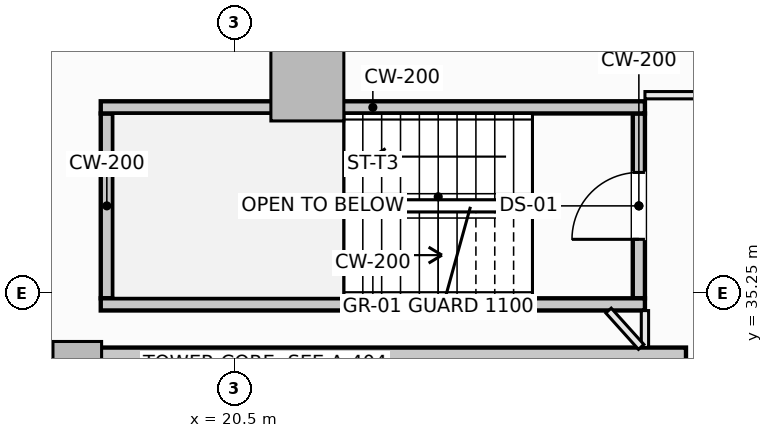
"""IFC4 building model, lengths in metres.
Left out: names, types, materials, properties, quantities, classifications, styles, units other than length and angle.
Written with IfcOpenShell. Run it as: python <this file> out.ifc"""

import sys

from ifc_helpers import new_model, si_unit, direction, frame, frame_2d, origin, origin_2d, place, context, subcontext, project, spatial, rectangle, extrude, element, fill, save


model = new_model("IFC4")
c1 = context("Model", 3, precision=1e-05, world=origin(), true_north=direction((0.0, 1.0)))
c2 = subcontext(c1, "Body", "Model", "MODEL_VIEW")
j1 = project(units=[si_unit("LENGTHUNIT", "METRE"), si_unit("PLANEANGLEUNIT", "RADIAN")], contexts=[c1])
p1 = place(None, origin())
s1 = spatial("IfcSite", under=j1, at=p1, CompositionType="ELEMENT")
p2 = place(p1, origin())
s2 = spatial("IfcBuilding", under=s1, at=p2, CompositionType="ELEMENT")
p3 = place(p2, frame((0.0, 0.0, 88.1)))
s3 = spatial("IfcBuildingStorey", under=s2, at=p3, CompositionType="ELEMENT", Elevation=88.1)
p4 = place(p3, frame((14.075, 33.925, -0.28), z_axis=(0.0, 0.0, 1.0), x_axis=(1.0, 0.0, 0.0)))
e1 = element("IfcWall", 1, at=p4, inside=s3, PredefinedType="SHEAR", context=c2, shape_type="SweptSolid", body=[
    extrude(rectangle(XDim=13.85, YDim=0.85, at=frame_2d((6.925, 0.0))), origin(), (0.0, 0.0, 1.0), 3.85),
])
p5 = place(p3, frame((21.698, 38.677, -0.28), z_axis=(0.0, 0.0, 1.0), x_axis=(1.0, 0.0, 0.0)))
e2 = element("IfcColumn", 2, at=p5, inside=s3, PredefinedType="COLUMN", context=c2, shape_type="SweptSolid", body=[
    extrude(rectangle(XDim=1.2, YDim=1.2, at=origin_2d()), origin(), (0.0, 0.0, 1.0), 3.85),
])
p6 = place(p3, frame((17.914, 34.05, -0.28), z_axis=(0.0, 0.0, 1.0), x_axis=(1.0, 0.0, 0.0)))
e3 = element("IfcColumn", 3, at=p6, inside=s3, PredefinedType="PILASTER", context=c2, shape_type="SweptSolid", body=[
    extrude(rectangle(XDim=0.8, YDim=0.8, at=origin_2d()), origin(), (0.0, 0.0, 1.0), 3.85),
])
p7 = place(p3, frame((27.15, 35.16, -0.28), z_axis=(0.0, 0.0, 1.0), x_axis=(0.0, 1.0, 0.0)))
e4 = element("IfcWall", 4, at=p7, inside=s3, PredefinedType="SHEAR", context=c2, shape_type="SweptSolid", body=[
    extrude(rectangle(XDim=3.04, YDim=0.2, at=frame_2d((1.52, 0.0))), origin(), (0.0, 0.0, 1.0), 3.85),
])
p8 = place(p7, frame((0.97, 0.0, 0.28)))
e5 = element("IfcOpeningElement", 5, at=p8, cuts=e4, PredefinedType="OPENING", context=c2, shape_type="SweptSolid", body=[
    extrude(rectangle(XDim=1.1, YDim=2.15, at=frame_2d((0.55, 1.075))), frame((0.0, 0.11, 0.0), z_axis=(0.0, -1.0, 0.0), x_axis=(1.0, 0.0, 0.0)), (0.0, 0.0, 1.0), 0.22),
])
p9 = place(p3, frame((18.4, 35.16, -0.28), z_axis=(0.0, 0.0, 1.0), x_axis=(0.0, 1.0, 0.0)))
e6 = element("IfcWall", 6, at=p9, inside=s3, PredefinedType="SHEAR", context=c2, shape_type="SweptSolid", body=[
    extrude(rectangle(XDim=3.04, YDim=0.2, at=frame_2d((1.52, 0.0))), origin(), (0.0, 0.0, 1.0), 3.85),
])
for number, where, z_axis, x_axis in (
    (7, (18.3, 38.3, -0.28), (0.0, 0.0, 1.0), (1.0, 0.0, 0.0)),
    (8, (18.3, 35.06, -0.28), (0.0, 0.0, 1.0), (1.0, 0.0, 0.0)),
):
    element("IfcWall", number, at=place(p3, frame(where, z_axis=z_axis, x_axis=x_axis)), inside=s3, PredefinedType="SHEAR", context=c2, shape_type="SweptSolid", body=[
        extrude(rectangle(XDim=8.95, YDim=0.2, at=frame_2d((4.475, 0.0))), origin(), (0.0, 0.0, 1.0), 3.85),
    ])
p10 = place(p3, frame((27.25, 34.352, 0.0), z_axis=(0.0, 0.0, 1.0), x_axis=(0.0, 1.0, 0.0)))
e9 = element("IfcWall", 9, at=p10, inside=s3, PredefinedType="PARTITIONING", context=c2, shape_type="SweptSolid", body=[
    extrude(rectangle(XDim=0.606, YDim=0.12, at=frame_2d((0.303, 0.0))), origin(), (0.0, 0.0, 1.0), 3.57),
])
p11 = place(p3, frame((27.25, 38.5, 0.0), z_axis=(0.0, 0.0, 1.0), x_axis=(1.0, 0.0, 0.0)))
e10 = element("IfcWall", 10, at=p11, inside=s3, PredefinedType="PARTITIONING", context=c2, shape_type="SweptSolid", body=[
    extrude(rectangle(XDim=2.53, YDim=0.12, at=frame_2d((1.265, 0.0))), origin(), (0.0, 0.0, 1.0), 3.57),
])
p12 = place(p3, frame((26.651, 34.958, 0.0), z_axis=(0.0, 0.0, 1.0), x_axis=(0.668729584791, -0.743505711091, 0.0)))
e11 = element("IfcWall", 11, at=p12, inside=s3, PredefinedType="PARTITIONING", context=c2, shape_type="SweptSolid", body=[
    extrude(rectangle(XDim=0.803, YDim=0.12, at=frame_2d((0.402, 0.0))), origin(), (0.0, 0.0, 1.0), 3.57),
])
p13 = place(p8, origin())
e12 = element("IfcDoor", 12, at=p13, inside=s3, OperationType="SINGLE_SWING_LEFT", PredefinedType="DOOR", context=c2, shape_type="SweptSolid", body=[
    extrude(rectangle(XDim=1.1, YDim=2.15, at=frame_2d((0.55, 1.075))), frame((0.0, 0.025, 0.0), z_axis=(0.0, -1.0, 0.0), x_axis=(1.0, 0.0, 0.0)), (0.0, 0.0, 1.0), 0.05),
])
fill(e5, e12)
save(model, sys.argv[1])
